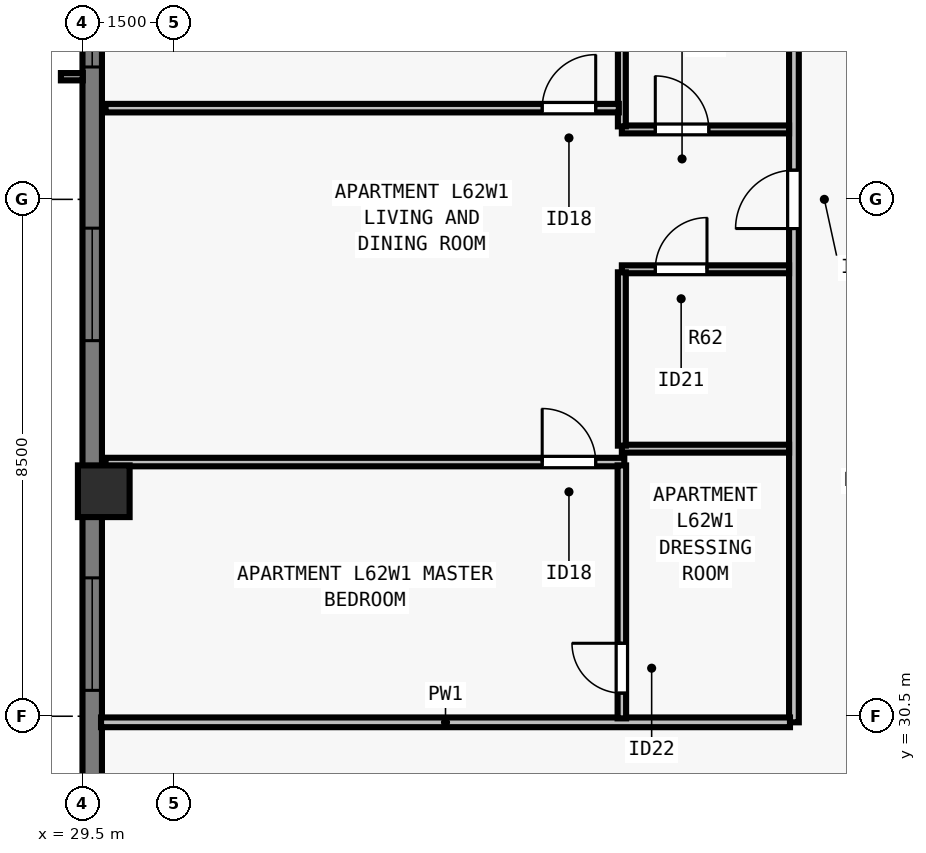
"""IFC4 building model, lengths in metres.
Left out: names, types, materials, properties, quantities, classifications, styles, units other than length and angle.
Written with IfcOpenShell. Run it as: python <this file> out.ifc"""

import sys

from ifc_helpers import new_model, si_unit, direction, frame, frame_2d, origin, origin_2d, place, context, subcontext, project, spatial, rectangle, extrude, element, fill, save


model = new_model("IFC4")
c1 = context("Model", 3, precision=1e-05, world=origin(), true_north=direction((0.0, 1.0)))
c2 = subcontext(c1, "Body", "Model", "MODEL_VIEW")
j1 = project(units=[si_unit("LENGTHUNIT", "METRE"), si_unit("PLANEANGLEUNIT", "RADIAN")], contexts=[c1])
p1 = place(None, origin())
s1 = spatial("IfcSite", under=j1, at=p1, CompositionType="ELEMENT")
p2 = place(p1, origin())
s2 = spatial("IfcBuilding", under=s1, at=p2, CompositionType="ELEMENT")
p3 = place(p2, frame((0.0, 0.0, 227.0)))
s3 = spatial("IfcBuildingStorey", under=s2, at=p3, CompositionType="ELEMENT", Elevation=227.0)
p4 = place(p3, frame((29.85, 34.2, 0.0), z_axis=(0.0, 0.0, 1.0), x_axis=(0.0, 1.0, 0.0)))
e1 = element("IfcColumn", 1, at=p4, inside=s3, PredefinedType="COLUMN", context=c2, shape_type="SweptSolid", body=[
    extrude(rectangle(XDim=0.85, YDim=0.85, at=origin_2d()), origin(), (0.0, 0.0, 1.0), 3.5),
])
p5 = place(p3, frame((29.66, 21.5, 0.0), z_axis=(0.0, 0.0, 1.0), x_axis=(0.0, 1.0, 0.0)))
e2 = element("IfcWall", 2, at=p5, inside=s3, PredefinedType="SOLIDWALL", context=c2, shape_type="SweptSolid", body=[
    extrude(rectangle(XDim=22.602, YDim=0.32, at=frame_2d((11.301, 0.0))), origin(), (0.0, 0.0, 1.0), 3.29),
])
p6 = place(p5, frame((4.825, 0.0, 0.8)))
e3 = element("IfcOpeningElement", 3, at=p6, cuts=e2, PredefinedType="OPENING", context=c2, shape_type="SweptSolid", body=[
    extrude(rectangle(XDim=1.55, YDim=1.678, at=frame_2d((0.775, 0.839))), frame((0.0, 0.17, 0.0), z_axis=(0.0, -1.0, 0.0), x_axis=(1.0, 0.0, 0.0)), (0.0, 0.0, 1.0), 0.34),
])
p7 = place(p5, frame((9.426, 0.0, 0.8)))
e4 = element("IfcOpeningElement", 4, at=p7, cuts=e2, PredefinedType="OPENING", context=c2, shape_type="SweptSolid", body=[
    extrude(rectangle(XDim=1.85, YDim=1.678, at=frame_2d((0.925, 0.839))), frame((0.0, 0.17, 0.0), z_axis=(0.0, -1.0, 0.0), x_axis=(1.0, 0.0, 0.0)), (0.0, 0.0, 1.0), 0.34),
])
p8 = place(p5, frame((15.177, 0.0, 0.8)))
e5 = element("IfcOpeningElement", 5, at=p8, cuts=e2, PredefinedType="OPENING", context=c2, shape_type="SweptSolid", body=[
    extrude(rectangle(XDim=1.85, YDim=1.678, at=frame_2d((0.925, 0.839))), frame((0.0, 0.17, 0.0), z_axis=(0.0, -1.0, 0.0), x_axis=(1.0, 0.0, 0.0)), (0.0, 0.0, 1.0), 0.34),
])
p9 = place(p5, frame((19.677, 0.0, 0.8)))
e6 = element("IfcOpeningElement", 6, at=p9, cuts=e2, PredefinedType="OPENING", context=c2, shape_type="SweptSolid", body=[
    extrude(rectangle(XDim=1.55, YDim=1.678, at=frame_2d((0.775, 0.839))), frame((0.0, 0.17, 0.0), z_axis=(0.0, -1.0, 0.0), x_axis=(1.0, 0.0, 0.0)), (0.0, 0.0, 1.0), 0.34),
])
p10 = place(p3, frame((41.2, 30.4, 0.0), z_axis=(0.0, 0.0, 1.0), x_axis=(0.0, 1.0, 0.0)))
e7 = element("IfcWall", 7, at=p10, inside=s3, PredefinedType="PARTITIONING", context=c2, shape_type="SweptSolid", body=[
    extrude(rectangle(XDim=17.2, YDim=0.16, at=frame_2d((8.6, 0.0))), origin(), (0.0, 0.0, 1.0), 3.29),
])
p11 = place(p10, frame((8.12, 0.0, 0.0)))
e8 = element("IfcOpeningElement", 8, at=p11, cuts=e7, PredefinedType="OPENING", context=c2, shape_type="SweptSolid", body=[
    extrude(rectangle(XDim=0.96, YDim=2.18, at=frame_2d((0.48, 1.09))), frame((0.0, 0.09, 0.0), z_axis=(0.0, -1.0, 0.0), x_axis=(1.0, 0.0, 0.0)), (0.0, 0.0, 1.0), 0.18),
])
p12 = place(p3, frame((29.805, 30.4, 0.0), z_axis=(0.0, 0.0, 1.0), x_axis=(1.0, 0.0, 0.0)))
e9 = element("IfcWall", 9, at=p12, inside=s3, PredefinedType="PARTITIONING", context=c2, shape_type="SweptSolid", body=[
    extrude(rectangle(XDim=11.33, YDim=0.16, at=frame_2d((5.665, 0.0))), origin(), (0.0, 0.0, 1.0), 3.29),
])
p13 = place(p3, frame((38.37, 34.9, 0.0), z_axis=(0.0, 0.0, 1.0), x_axis=(1.0, 0.0, 0.0)))
e10 = element("IfcWall", 10, at=p13, inside=s3, PredefinedType="PLUMBINGWALL", context=c2, shape_type="SweptSolid", body=[
    extrude(rectangle(XDim=2.75, YDim=0.13, at=frame_2d((1.375, 0.0))), origin(), (0.0, 0.0, 1.0), 3.29),
])
p14 = place(p3, frame((38.37, 37.85, 0.0), z_axis=(0.0, 0.0, 1.0), x_axis=(1.0, 0.0, 0.0)))
e11 = element("IfcWall", 11, at=p14, inside=s3, PredefinedType="PLUMBINGWALL", context=c2, shape_type="SweptSolid", body=[
    extrude(rectangle(XDim=2.75, YDim=0.13, at=frame_2d((1.375, 0.0))), origin(), (0.0, 0.0, 1.0), 3.29),
])
p15 = place(p14, frame((0.55, 0.0, 0.0)))
e12 = element("IfcOpeningElement", 12, at=p15, cuts=e11, PredefinedType="OPENING", context=c2, shape_type="SweptSolid", body=[
    extrude(rectangle(XDim=0.85, YDim=2.08, at=frame_2d((0.425, 1.04))), frame((0.0, 0.075, 0.0), z_axis=(0.0, -1.0, 0.0), x_axis=(1.0, 0.0, 0.0)), (0.0, 0.0, 1.0), 0.15),
])
p16 = place(p3, frame((38.37, 34.95, 0.0), z_axis=(0.0, 0.0, 1.0), x_axis=(0.0, 1.0, 0.0)))
e13 = element("IfcWall", 13, at=p16, inside=s3, PredefinedType="PLUMBINGWALL", context=c2, shape_type="SweptSolid", body=[
    extrude(rectangle(XDim=2.85, YDim=0.13, at=frame_2d((1.425, 0.0))), origin(), (0.0, 0.0, 1.0), 3.29),
])
p17 = place(p3, frame((38.37, 40.15, 0.0), z_axis=(0.0, 0.0, 1.0), x_axis=(1.0, 0.0, 0.0)))
e14 = element("IfcWall", 14, at=p17, inside=s3, PredefinedType="PLUMBINGWALL", context=c2, shape_type="SweptSolid", body=[
    extrude(rectangle(XDim=2.75, YDim=0.13, at=frame_2d((1.375, 0.0))), origin(), (0.0, 0.0, 1.0), 3.29),
])
p18 = place(p17, frame((0.55, 0.0, 0.0)))
e15 = element("IfcOpeningElement", 15, at=p18, cuts=e14, PredefinedType="OPENING", context=c2, shape_type="SweptSolid", body=[
    extrude(rectangle(XDim=0.88, YDim=2.1, at=frame_2d((0.44, 1.05))), frame((0.0, 0.075, 0.0), z_axis=(0.0, -1.0, 0.0), x_axis=(1.0, 0.0, 0.0)), (0.0, 0.0, 1.0), 0.15),
])
p19 = place(p3, frame((38.37, 40.2, 0.0), z_axis=(0.0, 0.0, 1.0), x_axis=(0.0, 1.0, 0.0)))
e16 = element("IfcWall", 16, at=p19, inside=s3, PredefinedType="PLUMBINGWALL", context=c2, shape_type="SweptSolid", body=[
    extrude(rectangle(XDim=3.15, YDim=0.13, at=frame_2d((1.575, 0.0))), origin(), (0.0, 0.0, 1.0), 3.29),
])
p20 = place(p3, frame((29.88, 34.68, 0.0), z_axis=(0.0, 0.0, 1.0), x_axis=(1.0, 0.0, 0.0)))
e17 = element("IfcWall", 17, at=p20, inside=s3, PredefinedType="PARTITIONING", context=c2, shape_type="SweptSolid", body=[
    extrude(rectangle(XDim=8.53, YDim=0.14, at=frame_2d((4.265, 0.0))), origin(), (0.0, 0.0, 1.0), 2.958),
])
p21 = place(p20, frame((7.18, 0.0, 0.0)))
e18 = element("IfcOpeningElement", 18, at=p21, cuts=e17, PredefinedType="OPENING", context=c2, shape_type="SweptSolid", body=[
    extrude(rectangle(XDim=0.88, YDim=2.1, at=frame_2d((0.44, 1.05))), frame((0.0, 0.08, 0.0), z_axis=(0.0, -1.0, 0.0), x_axis=(1.0, 0.0, 0.0)), (0.0, 0.0, 1.0), 0.16),
])
p22 = place(p3, frame((38.37, 30.465, 0.0), z_axis=(0.0, 0.0, 1.0), x_axis=(0.0, 1.0, 0.0)))
e19 = element("IfcWall", 19, at=p22, inside=s3, PredefinedType="PARTITIONING", context=c2, shape_type="SweptSolid", body=[
    extrude(rectangle(XDim=4.16, YDim=0.14, at=frame_2d((2.08, 0.0))), origin(), (0.0, 0.0, 1.0), 3.29),
])
p23 = place(p22, frame((0.415, 0.0, 0.0)))
e20 = element("IfcOpeningElement", 20, at=p23, cuts=e19, PredefinedType="OPENING", context=c2, shape_type="SweptSolid", body=[
    extrude(rectangle(XDim=0.82, YDim=2.1, at=frame_2d((0.41, 1.05))), frame((0.0, 0.08, 0.0), z_axis=(0.0, -1.0, 0.0), x_axis=(1.0, 0.0, 0.0)), (0.0, 0.0, 1.0), 0.16),
])
p24 = place(p3, frame((29.88, 40.5, 0.0), z_axis=(0.0, 0.0, 1.0), x_axis=(1.0, 0.0, 0.0)))
e21 = element("IfcWall", 21, at=p24, inside=s3, PredefinedType="PARTITIONING", context=c2, shape_type="SweptSolid", body=[
    extrude(rectangle(XDim=8.44, YDim=0.14, at=frame_2d((4.22, 0.0))), origin(), (0.0, 0.0, 1.0), 2.958),
])
p25 = place(p24, frame((7.18, 0.0, 0.0)))
e22 = element("IfcOpeningElement", 22, at=p25, cuts=e21, PredefinedType="OPENING", context=c2, shape_type="SweptSolid", body=[
    extrude(rectangle(XDim=0.88, YDim=2.1, at=frame_2d((0.44, 1.05))), frame((0.0, 0.08, 0.0), z_axis=(0.0, -1.0, 0.0), x_axis=(1.0, 0.0, 0.0)), (0.0, 0.0, 1.0), 0.16),
])
p26 = place(p7, origin())
e23 = element("IfcWindow", 23, at=p26, inside=s3, PartitioningType="SINGLE_PANEL", PredefinedType="WINDOW", context=c2, shape_type="SweptSolid", body=[
    extrude(rectangle(XDim=1.85, YDim=1.678, at=frame_2d((0.925, 0.839))), frame((0.0, -0.05, 0.0), z_axis=(0.0, -1.0, 0.0), x_axis=(1.0, 0.0, 0.0)), (0.0, 0.0, 1.0), 0.06),
])
fill(e4, e23)
p27 = place(p8, origin())
e24 = element("IfcWindow", 24, at=p27, inside=s3, PartitioningType="SINGLE_PANEL", PredefinedType="WINDOW", context=c2, shape_type="SweptSolid", body=[
    extrude(rectangle(XDim=1.85, YDim=1.678, at=frame_2d((0.925, 0.839))), frame((0.0, -0.05, 0.0), z_axis=(0.0, -1.0, 0.0), x_axis=(1.0, 0.0, 0.0)), (0.0, 0.0, 1.0), 0.06),
])
fill(e5, e24)
p28 = place(p9, origin())
e25 = element("IfcWindow", 25, at=p28, inside=s3, PartitioningType="SINGLE_PANEL", PredefinedType="WINDOW", context=c2, shape_type="SweptSolid", body=[
    extrude(rectangle(XDim=1.55, YDim=1.678, at=frame_2d((0.775, 0.839))), frame((0.0, -0.05, 0.0), z_axis=(0.0, -1.0, 0.0), x_axis=(1.0, 0.0, 0.0)), (0.0, 0.0, 1.0), 0.06),
])
fill(e6, e25)
p29 = place(p15, origin())
e26 = element("IfcDoor", 26, at=p29, inside=s3, OperationType="SINGLE_SWING_RIGHT", PredefinedType="DOOR", context=c2, shape_type="SweptSolid", body=[
    extrude(rectangle(XDim=0.85, YDim=2.08, at=frame_2d((0.425, 1.04))), frame((0.0, 0.025, 0.0), z_axis=(0.0, -1.0, 0.0), x_axis=(1.0, 0.0, 0.0)), (0.0, 0.0, 1.0), 0.05),
])
fill(e12, e26)
p30 = place(p18, origin())
e27 = element("IfcDoor", 27, at=p30, inside=s3, OperationType="SINGLE_SWING_LEFT", PredefinedType="DOOR", context=c2, shape_type="SweptSolid", body=[
    extrude(rectangle(XDim=0.88, YDim=2.1, at=frame_2d((0.44, 1.05))), frame((0.0, 0.025, 0.0), z_axis=(0.0, -1.0, 0.0), x_axis=(1.0, 0.0, 0.0)), (0.0, 0.0, 1.0), 0.05),
])
fill(e15, e27)
p31 = place(p23, origin())
e28 = element("IfcDoor", 28, at=p31, inside=s3, OperationType="SINGLE_SWING_RIGHT", PredefinedType="DOOR", context=c2, shape_type="SweptSolid", body=[
    extrude(rectangle(XDim=0.82, YDim=2.1, at=frame_2d((0.41, 1.05))), frame((0.0, 0.025, 0.0), z_axis=(0.0, -1.0, 0.0), x_axis=(1.0, 0.0, 0.0)), (0.0, 0.0, 1.0), 0.05),
])
fill(e20, e28)
p32 = place(p21, origin())
e29 = element("IfcDoor", 29, at=p32, inside=s3, OperationType="SINGLE_SWING_LEFT", PredefinedType="DOOR", context=c2, shape_type="SweptSolid", body=[
    extrude(rectangle(XDim=0.88, YDim=2.1, at=frame_2d((0.44, 1.05))), frame((0.0, 0.025, 0.0), z_axis=(0.0, -1.0, 0.0), x_axis=(1.0, 0.0, 0.0)), (0.0, 0.0, 1.0), 0.05),
])
fill(e18, e29)
p33 = place(p25, origin())
e30 = element("IfcDoor", 30, at=p33, inside=s3, OperationType="SINGLE_SWING_RIGHT", PredefinedType="DOOR", context=c2, shape_type="SweptSolid", body=[
    extrude(rectangle(XDim=0.88, YDim=2.1, at=frame_2d((0.44, 1.05))), frame((0.0, 0.025, 0.0), z_axis=(0.0, -1.0, 0.0), x_axis=(1.0, 0.0, 0.0)), (0.0, 0.0, 1.0), 0.05),
])
fill(e22, e30)
p34 = place(p11, origin())
e31 = element("IfcDoor", 31, at=p34, inside=s3, OperationType="SINGLE_SWING_LEFT", PredefinedType="DOOR", context=c2, shape_type="SweptSolid", body=[
    extrude(rectangle(XDim=0.96, YDim=2.18, at=frame_2d((0.48, 1.09))), frame((0.0, 0.025, 0.0), z_axis=(0.0, -1.0, 0.0), x_axis=(1.0, 0.0, 0.0)), (0.0, 0.0, 1.0), 0.05),
])
fill(e8, e31)
save(model, sys.argv[1])
